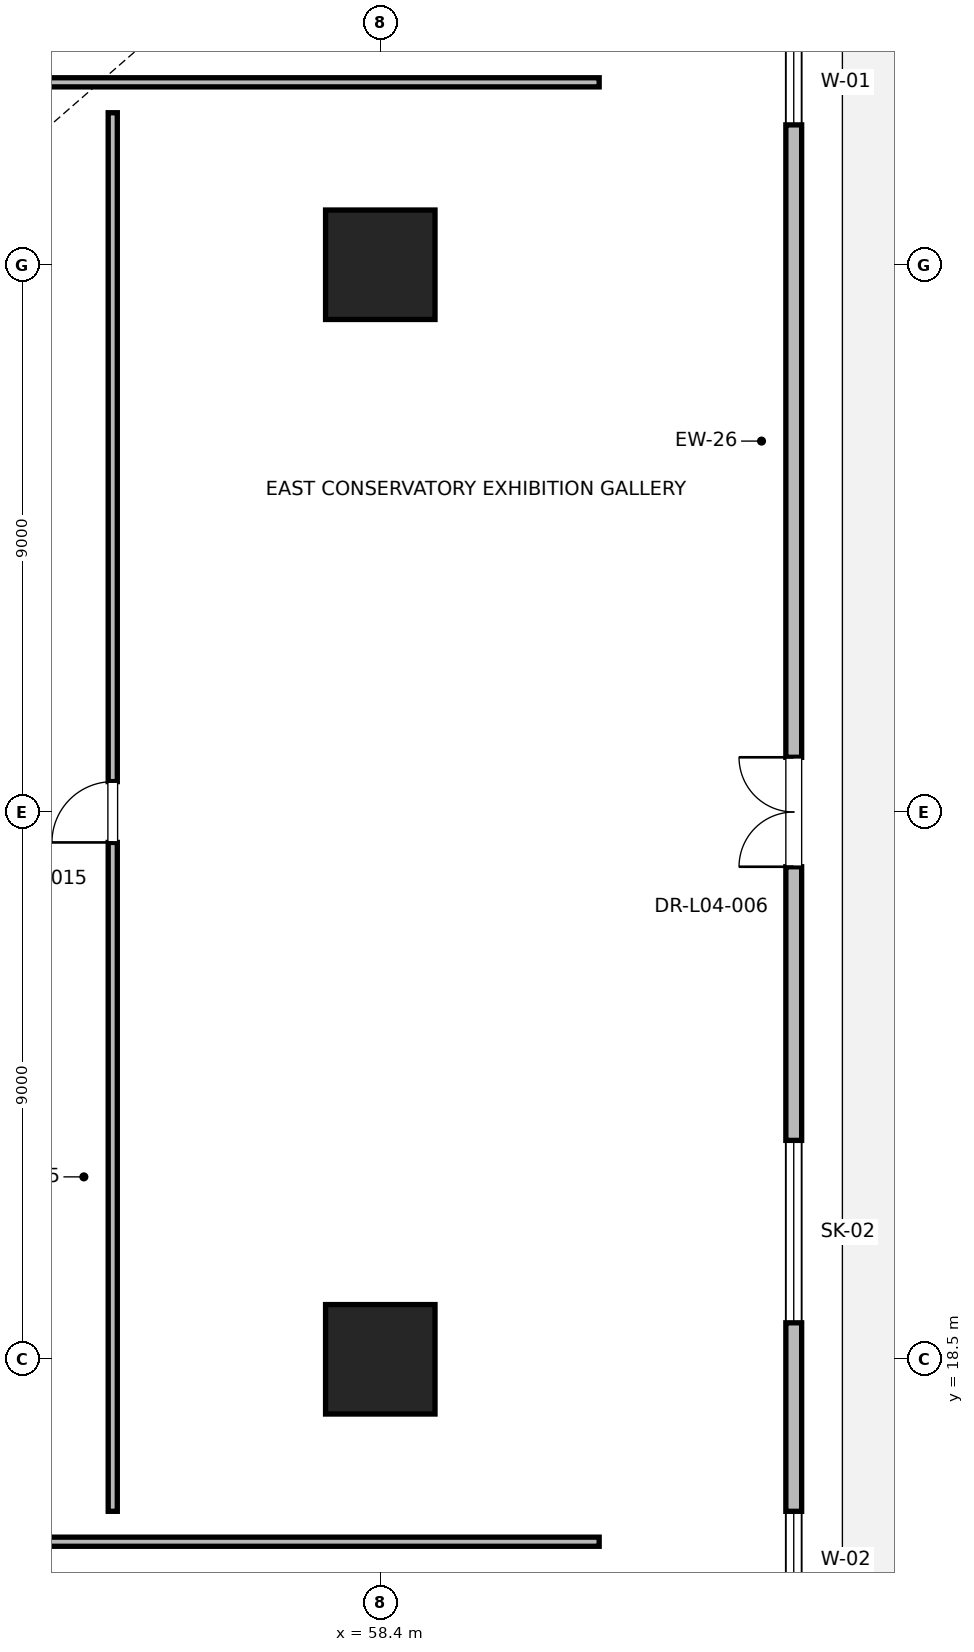
"""IFC4 building model, lengths in metres.
Left out: names, types, materials, properties, quantities, classifications, styles, units other than length and angle.
Written with IfcOpenShell. Run it as: python <this file> out.ifc"""

import sys

from ifc_helpers import new_model, si_unit, direction, frame, frame_2d, origin, origin_2d, place, context, subcontext, project, spatial, rectangle, extrude, element, fill, save


model = new_model("IFC4")
c1 = context("Model", 3, precision=1e-05, world=origin(), true_north=direction((0.0, 1.0)))
c2 = subcontext(c1, "Body", "Model", "MODEL_VIEW")
j1 = project(units=[si_unit("LENGTHUNIT", "METRE"), si_unit("PLANEANGLEUNIT", "RADIAN")], contexts=[c1])
p1 = place(None, origin())
s1 = spatial("IfcSite", under=j1, at=p1, CompositionType="ELEMENT")
p2 = place(p1, origin())
s2 = spatial("IfcBuilding", under=s1, at=p2, CompositionType="ELEMENT")
p3 = place(p2, frame((0.0, 0.0, 21.6)))
s3 = spatial("IfcBuildingStorey", under=s2, at=p3, CompositionType="ELEMENT", Elevation=21.6)
for number, where, z_axis, x_axis in (
    (1, (58.4, 18.5, 0.0), (0.0, 0.0, 1.0), (1.0, 0.0, 0.0)),
    (2, (58.4, 36.5, 0.0), (0.0, 0.0, 1.0), (1.0, 0.0, 0.0)),
):
    element("IfcColumn", number, at=place(p3, frame(where, z_axis=z_axis, x_axis=x_axis)), inside=s3, PredefinedType="COLUMN", context=c2, shape_type="SweptSolid", body=[
        extrude(rectangle(XDim=1.8, YDim=1.8, at=origin_2d()), origin(), (0.0, 0.0, 1.0), 6.0),
    ])
p4 = place(p3, frame((65.2, 11.6, 0.0), z_axis=(0.0, 0.0, 1.0), x_axis=(0.0, 1.0, 0.0)))
e3 = element("IfcWall", 3, at=p4, inside=s3, PredefinedType="PARAPET", context=c2, shape_type="SweptSolid", body=[
    extrude(rectangle(XDim=31.8, YDim=0.26, at=frame_2d((15.9, 0.0))), origin(), (0.0, 0.0, 1.0), 4.889),
])
p5 = place(p4, frame((2.8, 0.0, 0.9)))
e4 = element("IfcOpeningElement", 4, at=p5, cuts=e3, PredefinedType="OPENING", context=c2, shape_type="SweptSolid", body=[
    extrude(rectangle(XDim=1.6, YDim=2.1, at=frame_2d((0.8, 1.05))), frame((0.0, 0.13, 0.0), z_axis=(0.0, -1.0, 0.0), x_axis=(1.0, 0.0, 0.0)), (0.0, 0.0, 1.0), 0.26),
])
p6 = place(p4, frame((7.5, 0.0, 2.85)))
e5 = element("IfcOpeningElement", 5, at=p6, cuts=e3, PredefinedType="OPENING", context=c2, shape_type="SweptSolid", body=[
    extrude(rectangle(XDim=3.0, YDim=1.4, at=frame_2d((1.5, 0.7))), frame((0.0, 0.13, 0.0), z_axis=(0.0, -1.0, 0.0), x_axis=(1.0, 0.0, 0.0)), (0.0, 0.0, 1.0), 0.26),
])
p7 = place(p4, frame((15.0, 0.0, 0.0)))
e6 = element("IfcOpeningElement", 6, at=p7, cuts=e3, PredefinedType="OPENING", context=c2, shape_type="SweptSolid", body=[
    extrude(rectangle(XDim=1.8, YDim=2.4, at=frame_2d((0.9, 1.2))), frame((0.0, 0.13, 0.0), z_axis=(0.0, -1.0, 0.0), x_axis=(1.0, 0.0, 0.0)), (0.0, 0.0, 1.0), 0.26),
])
p8 = place(p4, frame((27.2, 0.0, 0.95)))
e7 = element("IfcOpeningElement", 7, at=p8, cuts=e3, PredefinedType="OPENING", context=c2, shape_type="SweptSolid", body=[
    extrude(rectangle(XDim=1.4, YDim=2.0, at=frame_2d((0.7, 1.0))), frame((0.0, 0.13, 0.0), z_axis=(0.0, -1.0, 0.0), x_axis=(1.0, 0.0, 0.0)), (0.0, 0.0, 1.0), 0.26),
])
p9 = place(p3, frame((18.0, 15.5, 0.0), z_axis=(0.0, 0.0, 1.0), x_axis=(1.0, 0.0, 0.0)))
e8 = element("IfcWall", 8, at=p9, inside=s3, PredefinedType="PARTITIONING", context=c2, shape_type="SweptSolid", body=[
    extrude(rectangle(XDim=44.0, YDim=0.15, at=frame_2d((22.0, 0.0))), origin(), (0.0, 0.0, 1.0), 2.85),
])
p10 = place(p9, frame((21.5, 0.0, 0.0)))
e9 = element("IfcOpeningElement", 9, at=p10, cuts=e8, PredefinedType="OPENING", context=c2, shape_type="SweptSolid", body=[
    extrude(rectangle(XDim=1.0, YDim=2.15, at=frame_2d((0.5, 1.075))), frame((0.0, 0.075, 0.0), z_axis=(0.0, -1.0, 0.0), x_axis=(1.0, 0.0, 0.0)), (0.0, 0.0, 1.0), 0.15),
])
p11 = place(p3, frame((41.82, 39.5, 0.0), z_axis=(0.0, 0.0, 1.0), x_axis=(1.0, 0.0, 0.0)))
e10 = element("IfcWall", 10, at=p11, inside=s3, PredefinedType="PARTITIONING", context=c2, shape_type="SweptSolid", body=[
    extrude(rectangle(XDim=20.18, YDim=0.15, at=frame_2d((10.09, 0.0))), origin(), (0.0, 0.0, 1.0), 2.85),
])
p12 = place(p11, frame((9.59, 0.0, 0.0)))
e11 = element("IfcOpeningElement", 11, at=p12, cuts=e10, PredefinedType="OPENING", context=c2, shape_type="SweptSolid", body=[
    extrude(rectangle(XDim=1.0, YDim=2.15, at=frame_2d((0.5, 1.075))), frame((0.0, 0.075, 0.0), z_axis=(0.0, -1.0, 0.0), x_axis=(1.0, 0.0, 0.0)), (0.0, 0.0, 1.0), 0.15),
])
p13 = place(p3, frame((54.0, 16.0, 0.0), z_axis=(0.0, 0.0, 1.0), x_axis=(0.0, 1.0, 0.0)))
e12 = element("IfcWall", 12, at=p13, inside=s3, PredefinedType="PARTITIONING", context=c2, shape_type="SweptSolid", body=[
    extrude(rectangle(XDim=23.0, YDim=0.15, at=frame_2d((11.5, 0.0))), origin(), (0.0, 0.0, 1.0), 2.85),
])
p14 = place(p13, frame((11.0, 0.0, 0.0)))
e13 = element("IfcOpeningElement", 13, at=p14, cuts=e12, PredefinedType="OPENING", context=c2, shape_type="SweptSolid", body=[
    extrude(rectangle(XDim=1.0, YDim=2.15, at=frame_2d((0.5, 1.075))), frame((0.0, 0.075, 0.0), z_axis=(0.0, -1.0, 0.0), x_axis=(1.0, 0.0, 0.0)), (0.0, 0.0, 1.0), 0.15),
])
p15 = place(p5, origin())
e14 = element("IfcWindow", 14, at=p15, inside=s3, PartitioningType="SINGLE_PANEL", PredefinedType="WINDOW", context=c2, shape_type="SweptSolid", body=[
    extrude(rectangle(XDim=1.6, YDim=2.1, at=frame_2d((0.8, 1.05))), frame((0.0, 0.03, 0.0), z_axis=(0.0, -1.0, 0.0), x_axis=(1.0, 0.0, 0.0)), (0.0, 0.0, 1.0), 0.06),
])
fill(e4, e14)
p16 = place(p6, origin())
e15 = element("IfcWindow", 15, at=p16, inside=s3, PartitioningType="SINGLE_PANEL", PredefinedType="SKYLIGHT", context=c2, shape_type="SweptSolid", body=[
    extrude(rectangle(XDim=3.0, YDim=1.4, at=frame_2d((1.5, 0.7))), frame((0.0, 0.03, 0.0), z_axis=(0.0, -1.0, 0.0), x_axis=(1.0, 0.0, 0.0)), (0.0, 0.0, 1.0), 0.06),
])
fill(e5, e15)
p17 = place(p7, origin())
e16 = element("IfcDoor", 16, at=p17, inside=s3, OperationType="DOUBLE_DOOR_SINGLE_SWING", PredefinedType="DOOR", context=c2, shape_type="SweptSolid", body=[
    extrude(rectangle(XDim=1.8, YDim=2.4, at=frame_2d((0.9, 1.2))), frame((0.0, 0.025, 0.0), z_axis=(0.0, -1.0, 0.0), x_axis=(1.0, 0.0, 0.0)), (0.0, 0.0, 1.0), 0.05),
])
fill(e6, e16)
p18 = place(p8, origin())
e17 = element("IfcWindow", 17, at=p18, inside=s3, PartitioningType="SINGLE_PANEL", PredefinedType="WINDOW", context=c2, shape_type="SweptSolid", body=[
    extrude(rectangle(XDim=1.4, YDim=2.0, at=frame_2d((0.7, 1.0))), frame((0.0, 0.03, 0.0), z_axis=(0.0, -1.0, 0.0), x_axis=(1.0, 0.0, 0.0)), (0.0, 0.0, 1.0), 0.06),
])
fill(e7, e17)
p19 = place(p14, origin())
e18 = element("IfcDoor", 18, at=p19, inside=s3, OperationType="SINGLE_SWING_LEFT", PredefinedType="DOOR", context=c2, shape_type="SweptSolid", body=[
    extrude(rectangle(XDim=1.0, YDim=2.15, at=frame_2d((0.5, 1.075))), frame((0.0, 0.025, 0.0), z_axis=(0.0, -1.0, 0.0), x_axis=(1.0, 0.0, 0.0)), (0.0, 0.0, 1.0), 0.05),
])
fill(e13, e18)
save(model, sys.argv[1])
